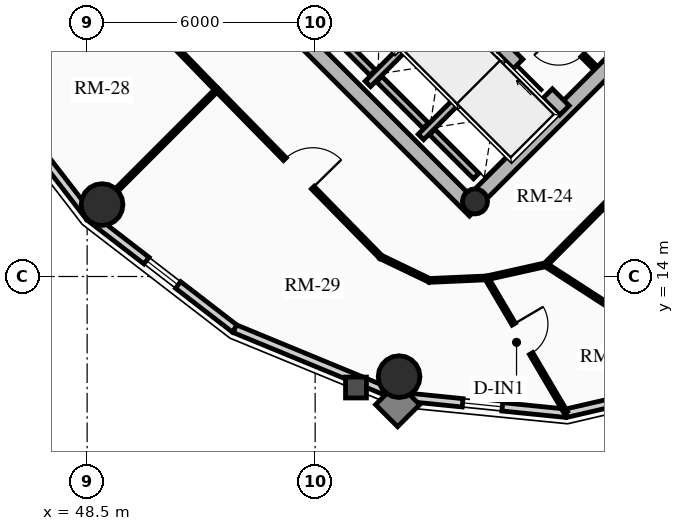
"""IFC4 building model, lengths in metres.
Left out: names, types, materials, properties, quantities, classifications, styles, units other than length and angle.
Written with IfcOpenShell. Run it as: python <this file> out.ifc"""

import sys

from ifc_helpers import new_model, si_unit, direction, frame, frame_2d, origin, origin_2d, place, context, subcontext, project, spatial, rectangle, circle, hollow_circle, extrude, source, transform, mapped, element, fill, save


model = new_model("IFC4")
c1 = context("Model", 3, precision=1e-05, world=origin(), true_north=direction((0.0, 1.0)))
c2 = subcontext(c1, "Body", "Model", "MODEL_VIEW")
j1 = project(units=[si_unit("LENGTHUNIT", "METRE"), si_unit("PLANEANGLEUNIT", "RADIAN")], contexts=[c1])
p1 = place(None, origin())
s1 = spatial("IfcSite", under=j1, at=p1, CompositionType="ELEMENT")
p2 = place(p1, origin())
s2 = spatial("IfcBuilding", under=s1, at=p2, CompositionType="ELEMENT")
p3 = place(p2, frame((0.0, 0.0, 232.45)))
s3 = spatial("IfcBuildingStorey", under=s2, at=p3, CompositionType="ELEMENT", Elevation=232.45)
p4 = place(p3, frame((58.702, 15.732, 0.0), z_axis=(0.0, 0.0, 1.0), x_axis=(-0.707106781187, 0.707106781187, 0.0)))
e1 = element("IfcWall", 1, at=p4, inside=s3, PredefinedType="SHEAR", context=c2, shape_type="SweptSolid", body=[
    extrude(rectangle(XDim=14.1, YDim=0.4, at=frame_2d((7.05, 0.0))), origin(), (0.0, 0.0, 1.0), 3.2),
])
p5 = place(p3, frame((58.561, 15.873, 0.0), z_axis=(0.0, 0.0, 1.0), x_axis=(0.707106781187, 0.707106781187, 0.0)))
e2 = element("IfcWall", 2, at=p5, inside=s3, PredefinedType="SHEAR", context=c2, shape_type="SweptSolid", body=[
    extrude(rectangle(XDim=10.7, YDim=0.4, at=frame_2d((5.35, 0.0))), origin(), (0.0, 0.0, 1.0), 3.2),
])
m1 = source(origin(), c2, "Body", "SweptSolid", [
    extrude(rectangle(XDim=1.5, YDim=2.02, at=frame_2d((0.75, 1.01))), frame((0.0, 0.21, 0.0), z_axis=(0.0, -1.0, 0.0), x_axis=(1.0, 0.0, 0.0)), (0.0, 0.0, 1.0), 0.42),
])
p6 = place(p5, frame((5.45, 0.0, 0.0)))
e3 = element("IfcOpeningElement", 3, at=p6, cuts=e2, PredefinedType="OPENING", context=c2, shape_type="MappedRepresentation", body=[
    mapped(m1, transform((0.0, 0.0, 0.0), x_axis=(1.0, 0.0, 0.0), y_axis=(0.0, 1.0, 0.0), z_axis=(0.0, 0.0, 1.0), scale=1.0)),
])
p7 = place(p3, frame((61.06, 18.373, 0.0), z_axis=(0.0, 0.0, 1.0), x_axis=(-0.707106781187, 0.707106781187, 0.0)))
e4 = element("IfcWall", 4, at=p7, inside=s3, PredefinedType="SHEAR", context=c2, shape_type="SweptSolid", body=[
    extrude(rectangle(XDim=13.7, YDim=0.35, at=frame_2d((6.85, 0.0))), origin(), (0.0, 0.0, 1.0), 3.2),
])
m2 = source(origin(), c2, "Body", "SweptSolid", [
    extrude(rectangle(XDim=1.1, YDim=2.015, at=frame_2d((0.55, 1.007))), frame((0.0, 0.185, 0.0), z_axis=(0.0, -1.0, 0.0), x_axis=(1.0, 0.0, 0.0)), (0.0, 0.0, 1.0), 0.37),
])
p8 = place(p7, frame((4.85, 0.0, 0.0)))
e5 = element("IfcOpeningElement", 5, at=p8, cuts=e4, PredefinedType="OPENING", context=c2, shape_type="MappedRepresentation", body=[
    mapped(m2, transform((0.0, 0.0, 0.0), x_axis=(1.0, 0.0, 0.0), y_axis=(0.0, 1.0, 0.0), z_axis=(0.0, 0.0, 1.0), scale=1.0)),
])
p9 = place(p7, frame((0.625, 0.0, 0.0)))
e6 = element("IfcOpeningElement", 6, at=p9, cuts=e4, PredefinedType="OPENING", context=c2, shape_type="MappedRepresentation", body=[
    mapped(m2, transform((0.0, 0.0, 0.0), x_axis=(1.0, 0.0, 0.0), y_axis=(0.0, 1.0, 0.0), z_axis=(0.0, 0.0, 1.0), scale=1.0)),
])
p10 = place(p7, frame((2.625, 0.0, 0.0)))
e7 = element("IfcOpeningElement", 7, at=p10, cuts=e4, PredefinedType="OPENING", context=c2, shape_type="MappedRepresentation", body=[
    mapped(m2, transform((0.0, 0.0, 0.0), x_axis=(1.0, 0.0, 0.0), y_axis=(0.0, 1.0, 0.0), z_axis=(0.0, 0.0, 1.0), scale=1.0)),
])
m3 = source(origin(), c2, "Body", "SweptSolid", [
    extrude(rectangle(XDim=1.15, YDim=2.02, at=frame_2d((0.575, 1.01))), frame((0.0, 0.185, 0.0), z_axis=(0.0, -1.0, 0.0), x_axis=(1.0, 0.0, 0.0)), (0.0, 0.0, 1.0), 0.37),
])
p11 = place(p7, frame((7.27, 0.0, 0.0)))
e8 = element("IfcOpeningElement", 8, at=p11, cuts=e4, PredefinedType="OPENING", context=c2, shape_type="MappedRepresentation", body=[
    mapped(m3, transform((0.0, 0.0, 0.0), x_axis=(1.0, 0.0, 0.0), y_axis=(0.0, 1.0, 0.0), z_axis=(0.0, 0.0, 1.0), scale=1.0)),
])
p12 = place(p3, frame((58.706, 15.976, 0.0), z_axis=(0.0, 0.0, 1.0), x_axis=(0.707106781187, 0.707106781187, 0.0)))
e9 = element("IfcColumn", 9, at=p12, inside=s3, PredefinedType="COLUMN", context=c2, shape_type="SweptSolid", body=[
    extrude(hollow_circle(Radius=0.33, WallThickness=0.025, at=origin_2d()), origin(), (0.0, 0.0, 1.0), 3.2),
])
for number, where, z_axis, x_axis in (
    (10, (48.893, 15.893, 0.0), (0.0, 0.0, 1.0), (1.0, 0.0, 0.0)),
    (11, (56.709, 11.365, 0.0), (0.0, 0.0, 1.0), (1.0, 0.0, 0.0)),
):
    element("IfcColumn", number, at=place(p3, frame(where, z_axis=z_axis, x_axis=x_axis)), inside=s3, PredefinedType="USERDEFINED", context=c2, shape_type="SweptSolid", body=[
        extrude(circle(Radius=0.55, at=origin_2d()), origin(), (0.0, 0.0, 1.0), 3.2),
    ])
p13 = place(p3, frame((48.569, 15.569, 0.0), z_axis=(0.0, 0.0, 1.0), x_axis=(-0.610523083886, 0.791998462147, 0.0)))
e12 = element("IfcWall", 12, at=p13, inside=s3, PredefinedType="SOLIDWALL", context=c2, shape_type="SweptSolid", body=[
    extrude(rectangle(XDim=4.82, YDim=0.22, at=frame_2d((2.41, 0.0))), origin(), (0.0, 0.0, 1.0), 2.402),
])
p14 = place(p3, frame((52.387, 12.626, 0.0), z_axis=(0.0, 0.0, 1.0), x_axis=(-0.791998462147, 0.610523083886, 0.0)))
e13 = element("IfcWall", 13, at=p14, inside=s3, PredefinedType="SOLIDWALL", context=c2, shape_type="SweptSolid", body=[
    extrude(rectangle(XDim=4.82, YDim=0.22, at=frame_2d((2.41, 0.0))), origin(), (0.0, 0.0, 1.0), 2.402),
])
m4 = source(origin(), c2, "Body", "SweptSolid", [
    extrude(rectangle(XDim=1.05, YDim=1.3, at=frame_2d((0.525, 0.65))), frame((0.0, 0.12, 0.0), z_axis=(0.0, -1.0, 0.0), x_axis=(1.0, 0.0, 0.0)), (0.0, 0.0, 1.0), 0.24),
])
p15 = place(p14, frame((1.885, 0.0, 0.65)))
e14 = element("IfcOpeningElement", 14, at=p15, cuts=e13, PredefinedType="OPENING", context=c2, shape_type="MappedRepresentation", body=[
    mapped(m4, transform((0.0, 0.0, 0.0), x_axis=(1.0, 0.0, 0.0), y_axis=(0.0, 1.0, 0.0), z_axis=(0.0, 0.0, 1.0), scale=1.0)),
])
p16 = place(p3, frame((56.705, 10.845, 0.0), z_axis=(0.0, 0.0, 1.0), x_axis=(-0.924447353237, 0.381309704956, 0.0)))
e15 = element("IfcWall", 15, at=p16, inside=s3, PredefinedType="SOLIDWALL", context=c2, shape_type="SweptSolid", body=[
    extrude(rectangle(XDim=4.671, YDim=0.22, at=frame_2d((2.335, 0.0))), origin(), (0.0, 0.0, 1.0), 2.402),
])
p17 = place(p3, frame((61.1, 10.401, 0.0), z_axis=(0.0, 0.0, 1.0), x_axis=(-0.994929930991, 0.100570534541, 0.0)))
e16 = element("IfcWall", 16, at=p17, inside=s3, PredefinedType="SOLIDWALL", context=c2, shape_type="SweptSolid", body=[
    extrude(rectangle(XDim=4.418, YDim=0.22, at=frame_2d((2.209, 0.0))), origin(), (0.0, 0.0, 1.0), 2.402),
])
p18 = place(p17, frame((1.684, 0.0, 0.65)))
e17 = element("IfcOpeningElement", 17, at=p18, cuts=e16, PredefinedType="OPENING", context=c2, shape_type="MappedRepresentation", body=[
    mapped(m4, transform((0.0, 0.0, 0.0), x_axis=(1.0, 0.0, 0.0), y_axis=(0.0, 1.0, 0.0), z_axis=(0.0, 0.0, 1.0), scale=1.0)),
])
p19 = place(p3, frame((65.144, 11.337, 0.0), z_axis=(0.0, 0.0, 1.0), x_axis=(-0.974249228678, -0.225473813158, 0.0)))
e18 = element("IfcWall", 18, at=p19, inside=s3, PredefinedType="SOLIDWALL", context=c2, shape_type="SweptSolid", body=[
    extrude(rectangle(XDim=4.15, YDim=0.22, at=frame_2d((2.075, 0.0))), origin(), (0.0, 0.0, 1.0), 2.402),
])
p20 = place(p19, frame((1.55, 0.0, 0.65)))
e19 = element("IfcOpeningElement", 19, at=p20, cuts=e18, PredefinedType="OPENING", context=c2, shape_type="MappedRepresentation", body=[
    mapped(m4, transform((0.0, 0.0, 0.0), x_axis=(1.0, 0.0, 0.0), y_axis=(0.0, 1.0, 0.0), z_axis=(0.0, 0.0, 1.0), scale=1.0)),
])
p21 = place(p3, frame((55.888, 19.069, 0.0), z_axis=(0.0, 0.0, 1.0), x_axis=(0.707106781187, 0.707106781187, 0.0)))
e20 = element("IfcWall", 20, at=p21, inside=s3, PredefinedType="SHEAR", context=c2, shape_type="SweptSolid", body=[
    extrude(rectangle(XDim=2.97, YDim=0.2, at=frame_2d((1.485, 0.0))), origin(), (0.0, 0.0, 1.0), 3.2),
])
p22 = place(p3, frame((56.015, 19.366, 0.0), z_axis=(0.0, 0.0, 1.0), x_axis=(-0.707106781187, 0.707106781187, 0.0)))
e21 = element("IfcWall", 21, at=p22, inside=s3, PredefinedType="SHEAR", context=c2, shape_type="SweptSolid", body=[
    extrude(rectangle(XDim=2.44, YDim=0.2, at=frame_2d((1.22, 0.0))), origin(), (0.0, 0.0, 1.0), 3.2),
])
p23 = place(p3, frame((57.284, 17.673, 0.0), z_axis=(0.0, 0.0, 1.0), x_axis=(0.707147878904, 0.70706568108, 0.0)))
e22 = element("IfcWall", 22, at=p23, inside=s3, PredefinedType="SHEAR", context=c2, shape_type="SweptSolid", body=[
    extrude(rectangle(XDim=2.97, YDim=0.2, at=frame_2d((1.485, 0.0))), origin(), (0.0, 0.0, 1.0), 3.2),
])
p24 = place(p3, frame((57.412, 17.97, 0.0), z_axis=(0.0, 0.0, 1.0), x_axis=(-0.707106781187, 0.707106781187, 0.0)))
e23 = element("IfcWall", 23, at=p24, inside=s3, PredefinedType="SHEAR", context=c2, shape_type="SweptSolid", body=[
    extrude(rectangle(XDim=1.735, YDim=0.2, at=frame_2d((0.867, 0.0))), origin(), (0.0, 0.0, 1.0), 3.2),
])
p25 = place(p3, frame((58.737, 16.644, 0.0), z_axis=(0.0, 0.0, 1.0), x_axis=(-0.707032117043, 0.707181437447, 0.0)))
e24 = element("IfcWall", 24, at=p25, inside=s3, PredefinedType="SHEAR", context=c2, shape_type="SweptSolid", body=[
    extrude(rectangle(XDim=1.635, YDim=0.2, at=frame_2d((0.817, 0.0))), origin(), (0.0, 0.0, 1.0), 3.2),
])
p26 = place(p3, frame((61.835, 19.529, 0.0), z_axis=(0.0, 0.0, 1.0), x_axis=(-0.707174592913, 0.707038962956, 0.0)))
e25 = element("IfcWall", 25, at=p26, inside=s3, PredefinedType="PARTITIONING", context=c2, shape_type="SweptSolid", body=[
    extrude(rectangle(XDim=1.8, YDim=0.125, at=frame_2d((0.9, 0.0))), origin(), (0.0, 0.0, 1.0), 2.765),
])
m5 = source(origin(), c2, "Body", "SweptSolid", [
    extrude(rectangle(XDim=0.9, YDim=2.005, at=frame_2d((0.45, 1.002))), frame((0.0, 0.073, 0.0), z_axis=(0.0, -1.0, 0.0), x_axis=(1.0, 0.0, 0.0)), (0.0, 0.0, 1.0), 0.145),
])
p27 = place(p26, frame((0.42, 0.0, 0.0)))
e26 = element("IfcOpeningElement", 26, at=p27, cuts=e25, PredefinedType="OPENING", context=c2, shape_type="MappedRepresentation", body=[
    mapped(m5, transform((0.0, 0.0, 0.0), x_axis=(1.0, 0.0, 0.0), y_axis=(0.0, 1.0, 0.0), z_axis=(0.0, 0.0, 1.0), scale=1.0)),
])
p28 = place(p3, frame((47.706, 23.253, 0.0), z_axis=(0.0, 0.0, 1.0), x_axis=(0.696179266346, -0.717867974707, 0.0)))
e27 = element("IfcWall", 27, at=p28, inside=s3, PredefinedType="MOVABLE", context=c2, shape_type="SweptSolid", body=[
    extrude(rectangle(XDim=6.045, YDim=0.1, at=frame_2d((3.022, 0.0))), origin(), (0.0, 0.0, 1.0), 2.335),
])
p29 = place(p3, frame((51.914, 18.914, 0.0), z_axis=(0.0, 0.0, 1.0), x_axis=(0.699999313799, -0.714143515465, 0.0)))
e28 = element("IfcWall", 28, at=p29, inside=s3, PredefinedType="MOVABLE", context=c2, shape_type="SweptSolid", body=[
    extrude(rectangle(XDim=6.162, YDim=0.1, at=frame_2d((3.081, 0.0))), origin(), (0.0, 0.0, 1.0), 2.335),
])
m6 = source(origin(), c2, "Body", "SweptSolid", [
    extrude(rectangle(XDim=1.05, YDim=2.015, at=frame_2d((0.525, 1.007))), frame((0.0, 0.06, 0.0), z_axis=(0.0, -1.0, 0.0), x_axis=(1.0, 0.0, 0.0)), (0.0, 0.0, 1.0), 0.12),
])
p30 = place(p29, frame((2.556, 0.0, 0.0)))
e29 = element("IfcOpeningElement", 29, at=p30, cuts=e28, PredefinedType="OPENING", context=c2, shape_type="MappedRepresentation", body=[
    mapped(m6, transform((0.0, 0.0, 0.0), x_axis=(1.0, 0.0, 0.0), y_axis=(0.0, 1.0, 0.0), z_axis=(0.0, 0.0, 1.0), scale=1.0)),
])
p31 = place(p3, frame((56.227, 14.513, 0.0), z_axis=(0.0, 0.0, 1.0), x_axis=(0.901477579283, -0.432825801044, 0.0)))
e30 = element("IfcWall", 30, at=p31, inside=s3, PredefinedType="MOVABLE", context=c2, shape_type="SweptSolid", body=[
    extrude(rectangle(XDim=1.424, YDim=0.1, at=frame_2d((0.712, 0.0))), origin(), (0.0, 0.0, 1.0), 2.335),
])
p32 = place(p3, frame((57.511, 13.897, 0.0), z_axis=(0.0, 0.0, 1.0), x_axis=(0.999024538494, 0.044158481476, 0.0)))
e31 = element("IfcWall", 31, at=p32, inside=s3, PredefinedType="MOVABLE", context=c2, shape_type="SweptSolid", body=[
    extrude(rectangle(XDim=1.498, YDim=0.1, at=frame_2d((0.749, 0.0))), origin(), (0.0, 0.0, 1.0), 2.402),
])
p33 = place(p3, frame((59.008, 13.963, 0.0), z_axis=(0.0, 0.0, 1.0), x_axis=(0.976020856791, 0.21767702476, 0.0)))
e32 = element("IfcWall", 32, at=p33, inside=s3, PredefinedType="MOVABLE", context=c2, shape_type="SweptSolid", body=[
    extrude(rectangle(XDim=1.593, YDim=0.1, at=frame_2d((0.796, 0.0))), origin(), (0.0, 0.0, 1.0), 2.335),
])
p34 = place(p3, frame((60.562, 14.31, 0.0), z_axis=(0.0, 0.0, 1.0), x_axis=(0.704566236161, 0.709638230975, 0.0)))
e33 = element("IfcWall", 33, at=p34, inside=s3, PredefinedType="MOVABLE", context=c2, shape_type="SweptSolid", body=[
    extrude(rectangle(XDim=3.321, YDim=0.1, at=frame_2d((1.661, 0.0))), origin(), (0.0, 0.0, 1.0), 2.402),
])
p35 = place(p3, frame((51.914, 18.914, 0.0), z_axis=(0.0, 0.0, 1.0), x_axis=(-0.707106781187, -0.707106781187, 0.0)))
e34 = element("IfcWall", 34, at=p35, inside=s3, PredefinedType="MOVABLE", context=c2, shape_type="SweptSolid", body=[
    extrude(rectangle(XDim=4.71, YDim=0.1, at=frame_2d((2.355, 0.0))), origin(), (0.0, 0.0, 1.0), 2.402),
])
p36 = place(p3, frame((60.562, 14.31, 0.0), z_axis=(0.0, 0.0, 1.0), x_axis=(0.839858797161, -0.542804938105, 0.0)))
e35 = element("IfcWall", 35, at=p36, inside=s3, PredefinedType="MOVABLE", context=c2, shape_type="SweptSolid", body=[
    extrude(rectangle(XDim=5.444, YDim=0.1, at=frame_2d((2.722, 0.0))), origin(), (0.0, 0.0, 1.0), 2.402),
])
p37 = place(p3, frame((47.706, 23.253, 0.0), z_axis=(0.0, 0.0, 1.0), x_axis=(-0.471384756618, -0.881927667799, 0.0)))
e36 = element("IfcWall", 36, at=p37, inside=s3, PredefinedType="MOVABLE", context=c2, shape_type="SweptSolid", body=[
    extrude(rectangle(XDim=4.374, YDim=0.1, at=frame_2d((2.187, 0.0))), origin(), (0.0, 0.0, 1.0), 2.335),
])
m7 = source(origin(), c2, "Body", "SweptSolid", [
    extrude(rectangle(XDim=0.9, YDim=2.005, at=frame_2d((0.45, 1.002))), frame((0.0, 0.06, 0.0), z_axis=(0.0, -1.0, 0.0), x_axis=(1.0, 0.0, 0.0)), (0.0, 0.0, 1.0), 0.12),
])
p38 = place(p37, frame((1.674, 0.0, 0.0)))
e37 = element("IfcOpeningElement", 37, at=p38, cuts=e36, PredefinedType="OPENING", context=c2, shape_type="MappedRepresentation", body=[
    mapped(m7, transform((0.0, 0.0, 0.0), x_axis=(1.0, 0.0, 0.0), y_axis=(0.0, 1.0, 0.0), z_axis=(0.0, 0.0, 1.0), scale=1.0)),
])
p39 = place(p3, frame((59.008, 13.963, 0.0), z_axis=(0.0, 0.0, 1.0), x_axis=(0.508047134864, -0.86132926849, 0.0)))
e38 = element("IfcWall", 38, at=p39, inside=s3, PredefinedType="MOVABLE", context=c2, shape_type="SweptSolid", body=[
    extrude(rectangle(XDim=4.113, YDim=0.1, at=frame_2d((2.056, 0.0))), origin(), (0.0, 0.0, 1.0), 2.335),
])
p40 = place(p39, frame((1.413, 0.0, 0.0)))
e39 = element("IfcOpeningElement", 39, at=p40, cuts=e38, PredefinedType="OPENING", context=c2, shape_type="MappedRepresentation", body=[
    mapped(m7, transform((0.0, 0.0, 0.0), x_axis=(1.0, 0.0, 0.0), y_axis=(0.0, 1.0, 0.0), z_axis=(0.0, 0.0, 1.0), scale=1.0)),
])
m8 = source(origin(), c2, "Body", "SweptSolid", [
    extrude(rectangle(XDim=1.05, YDim=1.3, at=frame_2d((0.525, 0.65))), frame((0.0, 0.03, 0.0), z_axis=(0.0, -1.0, 0.0), x_axis=(1.0, 0.0, 0.0)), (0.0, 0.0, 1.0), 0.06),
])
p41 = place(p15, origin())
e40 = element("IfcWindow", 40, at=p41, inside=s3, PartitioningType="SINGLE_PANEL", PredefinedType="WINDOW", context=c2, shape_type="MappedRepresentation", body=[
    mapped(m8, transform((0.0, 0.0, 0.0), x_axis=(1.0, 0.0, 0.0), y_axis=(0.0, 1.0, 0.0), z_axis=(0.0, 0.0, 1.0), scale=1.0)),
])
fill(e14, e40)
p42 = place(p18, origin())
e41 = element("IfcWindow", 41, at=p42, inside=s3, PartitioningType="SINGLE_PANEL", PredefinedType="WINDOW", context=c2, shape_type="MappedRepresentation", body=[
    mapped(m8, transform((0.0, 0.0, 0.0), x_axis=(1.0, 0.0, 0.0), y_axis=(0.0, 1.0, 0.0), z_axis=(0.0, 0.0, 1.0), scale=1.0)),
])
fill(e17, e41)
m9 = source(origin(), c2, "Body", "SweptSolid", [
    extrude(rectangle(XDim=1.1, YDim=2.015, at=frame_2d((0.55, 1.007))), frame((0.0, 0.025, 0.0), z_axis=(0.0, -1.0, 0.0), x_axis=(1.0, 0.0, 0.0)), (0.0, 0.0, 1.0), 0.05),
])
p43 = place(p9, origin())
e42 = element("IfcDoor", 42, at=p43, inside=s3, OperationType="SLIDING_TO_RIGHT", PredefinedType="DOOR", context=c2, shape_type="MappedRepresentation", body=[
    mapped(m9, transform((0.0, 0.0, 0.0), x_axis=(1.0, 0.0, 0.0), y_axis=(0.0, 1.0, 0.0), z_axis=(0.0, 0.0, 1.0), scale=1.0)),
])
fill(e6, e42)
m10 = source(origin(), c2, "Body", "SweptSolid", [
    extrude(rectangle(XDim=0.9, YDim=2.005, at=frame_2d((0.45, 1.002))), frame((0.0, 0.025, 0.0), z_axis=(0.0, -1.0, 0.0), x_axis=(1.0, 0.0, 0.0)), (0.0, 0.0, 1.0), 0.05),
])
p44 = place(p27, origin())
e43 = element("IfcDoor", 43, at=p44, inside=s3, OperationType="SINGLE_SWING_RIGHT", PredefinedType="DOOR", context=c2, shape_type="MappedRepresentation", body=[
    mapped(m10, transform((0.0, 0.0, 0.0), x_axis=(1.0, 0.0, 0.0), y_axis=(0.0, 1.0, 0.0), z_axis=(0.0, 0.0, 1.0), scale=1.0)),
])
fill(e26, e43)
m11 = source(origin(), c2, "Body", "SweptSolid", [
    extrude(rectangle(XDim=1.05, YDim=2.015, at=frame_2d((0.525, 1.007))), frame((0.0, 0.025, 0.0), z_axis=(0.0, -1.0, 0.0), x_axis=(1.0, 0.0, 0.0)), (0.0, 0.0, 1.0), 0.05),
])
p45 = place(p30, origin())
e44 = element("IfcDoor", 44, at=p45, inside=s3, OperationType="SINGLE_SWING_RIGHT", PredefinedType="DOOR", context=c2, shape_type="MappedRepresentation", body=[
    mapped(m11, transform((0.0, 0.0, 0.0), x_axis=(1.0, 0.0, 0.0), y_axis=(0.0, 1.0, 0.0), z_axis=(0.0, 0.0, 1.0), scale=1.0)),
])
fill(e29, e44)
p46 = place(p40, origin())
e45 = element("IfcDoor", 45, at=p46, inside=s3, OperationType="SINGLE_SWING_LEFT", PredefinedType="DOOR", context=c2, shape_type="MappedRepresentation", body=[
    mapped(m10, transform((0.0, 0.0, 0.0), x_axis=(1.0, 0.0, 0.0), y_axis=(0.0, 1.0, 0.0), z_axis=(0.0, 0.0, 1.0), scale=1.0)),
])
fill(e39, e45)
save(model, sys.argv[1])
